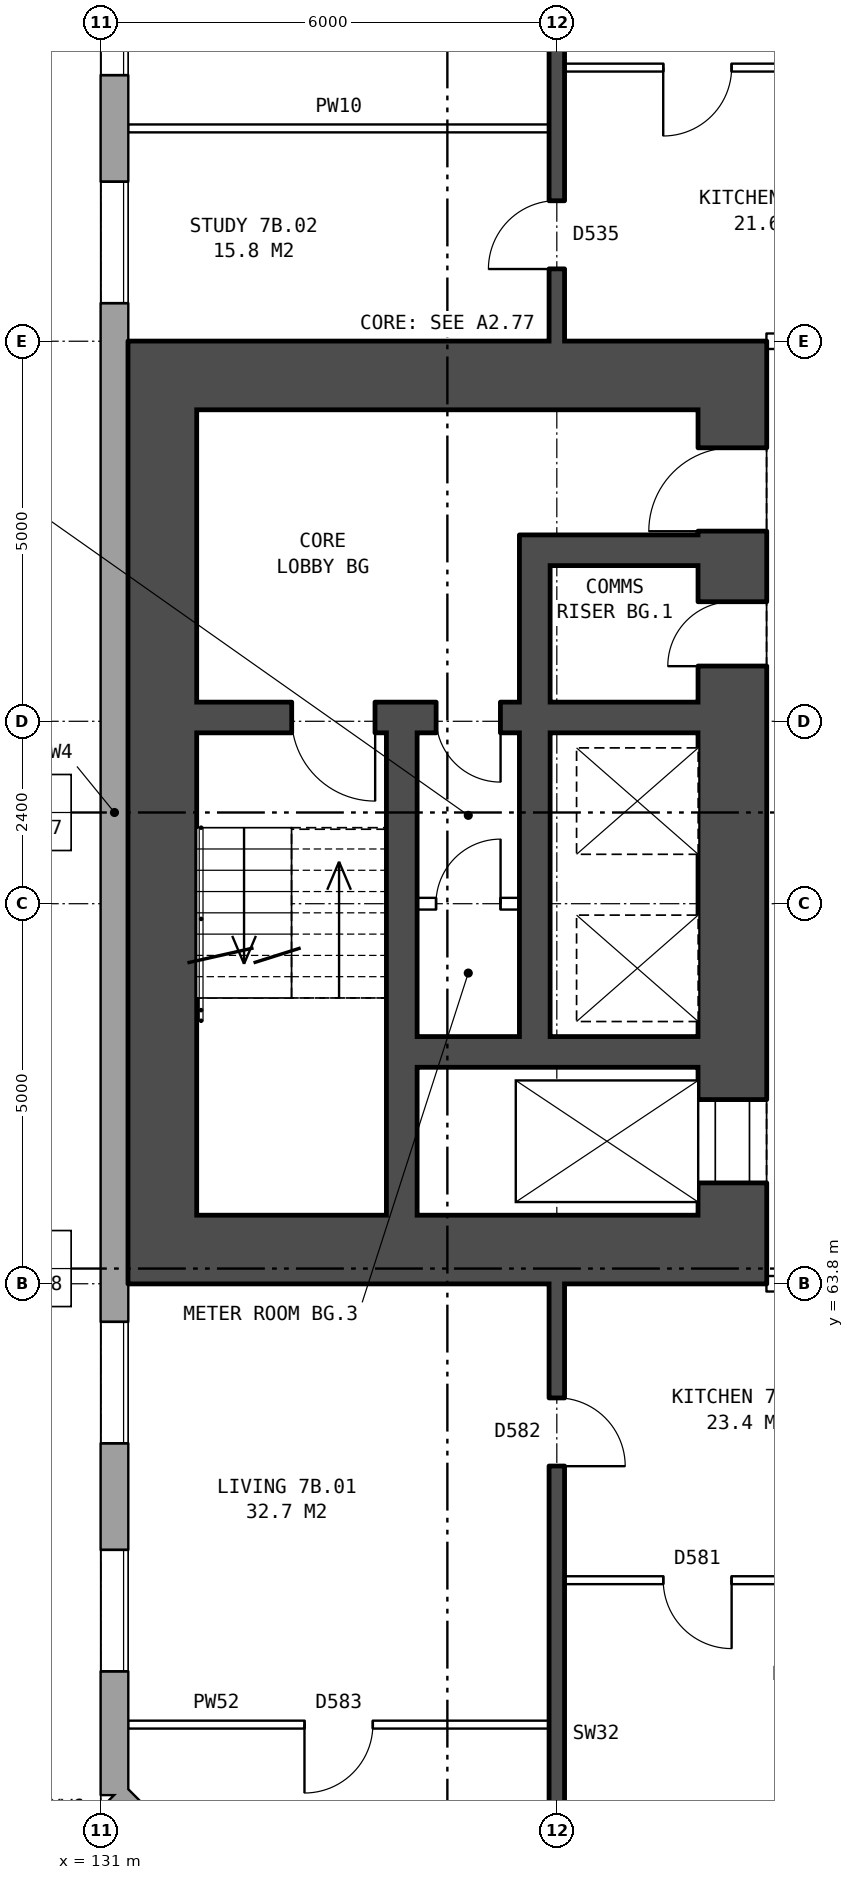
"""IFC4 building model, lengths in metres.
Left out: names, types, materials, properties, quantities, classifications, styles, units other than length and angle.
Written with IfcOpenShell. Run it as: python <this file> out.ifc"""

import sys

from ifc_helpers import new_model, si_unit, direction, frame, frame_2d, origin, place, context, subcontext, project, spatial, rectangle, extrude, element, fill, save


model = new_model("IFC4")
c1 = context("Model", 3, precision=1e-05, world=origin(), true_north=direction((0.0, 1.0)))
c2 = subcontext(c1, "Body", "Model", "MODEL_VIEW")
j1 = project(units=[si_unit("LENGTHUNIT", "METRE"), si_unit("PLANEANGLEUNIT", "RADIAN")], contexts=[c1])
p1 = place(None, origin())
s1 = spatial("IfcSite", under=j1, at=p1, CompositionType="ELEMENT")
p2 = place(p1, origin())
s2 = spatial("IfcBuilding", under=s1, at=p2, CompositionType="ELEMENT")
p3 = place(p2, frame((0.0, 0.0, 28.8)))
s3 = spatial("IfcBuildingStorey", under=s2, at=p3, CompositionType="ELEMENT", Elevation=28.8)
p4 = place(p3, frame((131.18, 57.075, 0.0), z_axis=(0.0, 0.0, 1.0), x_axis=(0.707106781187, -0.707106781187, 0.0)))
e1 = element("IfcWall", 1, at=p4, inside=s3, PredefinedType="STANDARD", context=c2, shape_type="SweptSolid", body=[
    extrude(rectangle(XDim=4.094, YDim=0.36, at=frame_2d((2.047, 0.0))), origin(), (0.0, 0.0, 1.0), 2.85),
])
p5 = place(p4, frame((1.247, 0.0, 0.8)))
e2 = element("IfcOpeningElement", 2, at=p5, cuts=e1, PredefinedType="OPENING", context=c2, shape_type="SweptSolid", body=[
    extrude(rectangle(XDim=1.6, YDim=1.8, at=frame_2d((0.8, 0.9))), frame((0.0, 0.19, 0.0), z_axis=(0.0, -1.0, 0.0), x_axis=(1.0, 0.0, 0.0)), (0.0, 0.0, 1.0), 0.38),
])
p6 = place(p3, frame((131.18, 82.925, 0.0), z_axis=(0.0, 0.0, 1.0), x_axis=(0.0, -1.0, 0.0)))
e3 = element("IfcWall", 3, at=p6, inside=s3, PredefinedType="STANDARD", context=c2, shape_type="SweptSolid", body=[
    extrude(rectangle(XDim=25.851, YDim=0.36, at=frame_2d((12.925, 0.0))), origin(), (0.0, 0.0, 1.0), 2.85),
])
p7 = place(p6, frame((1.625, 0.0, 0.8)))
e4 = element("IfcOpeningElement", 4, at=p7, cuts=e3, PredefinedType="OPENING", context=c2, shape_type="SweptSolid", body=[
    extrude(rectangle(XDim=1.6, YDim=1.8, at=frame_2d((0.8, 0.9))), frame((0.0, 0.19, 0.0), z_axis=(0.0, -1.0, 0.0), x_axis=(1.0, 0.0, 0.0)), (0.0, 0.0, 1.0), 0.38),
])
p8 = place(p6, frame((4.625, 0.0, 0.8)))
e5 = element("IfcOpeningElement", 5, at=p8, cuts=e3, PredefinedType="OPENING", context=c2, shape_type="SweptSolid", body=[
    extrude(rectangle(XDim=1.6, YDim=1.8, at=frame_2d((0.8, 0.9))), frame((0.0, 0.19, 0.0), z_axis=(0.0, -1.0, 0.0), x_axis=(1.0, 0.0, 0.0)), (0.0, 0.0, 1.0), 0.38),
])
p9 = place(p6, frame((19.625, 0.0, 0.8)))
e6 = element("IfcOpeningElement", 6, at=p9, cuts=e3, PredefinedType="OPENING", context=c2, shape_type="SweptSolid", body=[
    extrude(rectangle(XDim=1.6, YDim=1.8, at=frame_2d((0.8, 0.9))), frame((0.0, 0.19, 0.0), z_axis=(0.0, -1.0, 0.0), x_axis=(1.0, 0.0, 0.0)), (0.0, 0.0, 1.0), 0.38),
])
p10 = place(p6, frame((22.625, 0.0, 0.8)))
e7 = element("IfcOpeningElement", 7, at=p10, cuts=e3, PredefinedType="OPENING", context=c2, shape_type="SweptSolid", body=[
    extrude(rectangle(XDim=1.6, YDim=1.8, at=frame_2d((0.8, 0.9))), frame((0.0, 0.19, 0.0), z_axis=(0.0, -1.0, 0.0), x_axis=(1.0, 0.0, 0.0)), (0.0, 0.0, 1.0), 0.38),
])
p11 = place(p3, frame((139.31, 64.7, 0.0), z_axis=(0.0, 0.0, 1.0), x_axis=(0.0, 1.0, 0.0)))
e8 = element("IfcWall", 8, at=p11, inside=s3, PredefinedType="SHEAR", context=c2, shape_type="SweptSolid", body=[
    extrude(rectangle(XDim=10.6, YDim=0.9, at=frame_2d((5.3, 0.0))), origin(), (0.0, 0.0, 1.0), 2.85),
])
p12 = place(p11, frame((0.425, 0.0, 0.0)))
e9 = element("IfcOpeningElement", 9, at=p12, cuts=e8, PredefinedType="OPENING", context=c2, shape_type="SweptSolid", body=[
    extrude(rectangle(XDim=1.1, YDim=2.1, at=frame_2d((0.55, 1.05))), frame((0.0, 0.46, 0.0), z_axis=(0.0, -1.0, 0.0), x_axis=(1.0, 0.0, 0.0)), (0.0, 0.0, 1.0), 0.92),
])
p13 = place(p11, frame((9.0, 0.0, 0.0)))
e10 = element("IfcOpeningElement", 10, at=p13, cuts=e8, PredefinedType="OPENING", context=c2, shape_type="SweptSolid", body=[
    extrude(rectangle(XDim=1.1, YDim=2.1, at=frame_2d((0.55, 1.05))), frame((0.0, 0.46, 0.0), z_axis=(0.0, -1.0, 0.0), x_axis=(1.0, 0.0, 0.0)), (0.0, 0.0, 1.0), 0.92),
])
p14 = place(p11, frame((7.225, 0.0, 0.0)))
e11 = element("IfcOpeningElement", 11, at=p14, cuts=e8, PredefinedType="OPENING", context=c2, shape_type="SweptSolid", body=[
    extrude(rectangle(XDim=0.85, YDim=2.1, at=frame_2d((0.425, 1.05))), frame((0.0, 0.46, 0.0), z_axis=(0.0, -1.0, 0.0), x_axis=(1.0, 0.0, 0.0)), (0.0, 0.0, 1.0), 0.92),
])
p15 = place(p3, frame((131.81, 64.7, 0.0), z_axis=(0.0, 0.0, 1.0), x_axis=(0.0, 1.0, 0.0)))
e12 = element("IfcWall", 12, at=p15, inside=s3, PredefinedType="SHEAR", context=c2, shape_type="SweptSolid", body=[
    extrude(rectangle(XDim=10.6, YDim=0.9, at=frame_2d((5.3, 0.0))), origin(), (0.0, 0.0, 1.0), 2.85),
])
for number, where, z_axis, x_axis in (
    (13, (139.76, 64.25, 0.0), (0.0, 0.0, 1.0), (-1.0, 0.0, 0.0)),
    (14, (139.76, 75.75, 0.0), (0.0, 0.0, 1.0), (-1.0, 0.0, 0.0)),
):
    element("IfcWall", number, at=place(p3, frame(where, z_axis=z_axis, x_axis=x_axis)), inside=s3, PredefinedType="SHEAR", context=c2, shape_type="SweptSolid", body=[
        extrude(rectangle(XDim=8.4, YDim=0.9, at=frame_2d((4.2, 0.0))), origin(), (0.0, 0.0, 1.0), 2.85),
    ])
p16 = place(p3, frame((138.86, 66.85, 0.0), z_axis=(0.0, 0.0, 1.0), x_axis=(-1.0, 0.0, 0.0)))
e15 = element("IfcWall", 15, at=p16, inside=s3, PredefinedType="SHEAR", context=c2, shape_type="SweptSolid", body=[
    extrude(rectangle(XDim=3.7, YDim=0.4, at=frame_2d((1.85, 0.0))), origin(), (0.0, 0.0, 1.0), 2.85),
])
p17 = place(p3, frame((136.51, 68.8, 0.0), z_axis=(0.0, 0.0, 1.0), x_axis=(-1.0, 0.0, 0.0)))
e16 = element("IfcWall", 16, at=p17, inside=s3, PredefinedType="PARTITIONING", context=c2, shape_type="SweptSolid", body=[
    extrude(rectangle(XDim=1.35, YDim=0.15, at=frame_2d((0.675, 0.0))), origin(), (0.0, 0.0, 1.0), 2.85),
])
p18 = place(p17, frame((0.25, 0.0, 0.0)))
e17 = element("IfcOpeningElement", 17, at=p18, cuts=e16, PredefinedType="OPENING", context=c2, shape_type="SweptSolid", body=[
    extrude(rectangle(XDim=0.85, YDim=2.1, at=frame_2d((0.425, 1.05))), frame((0.0, 0.085, 0.0), z_axis=(0.0, -1.0, 0.0), x_axis=(1.0, 0.0, 0.0)), (0.0, 0.0, 1.0), 0.17),
])
p19 = place(p3, frame((138.86, 71.25, 0.0), z_axis=(0.0, 0.0, 1.0), x_axis=(-1.0, 0.0, 0.0)))
e18 = element("IfcWall", 18, at=p19, inside=s3, PredefinedType="SHEAR", context=c2, shape_type="SweptSolid", body=[
    extrude(rectangle(XDim=6.6, YDim=0.4, at=frame_2d((3.3, 0.0))), origin(), (0.0, 0.0, 1.0), 2.85),
])
p20 = place(p19, frame((4.25, 0.0, 0.0)))
e19 = element("IfcOpeningElement", 19, at=p20, cuts=e18, PredefinedType="OPENING", context=c2, shape_type="SweptSolid", body=[
    extrude(rectangle(XDim=1.1, YDim=2.1, at=frame_2d((0.55, 1.05))), frame((0.0, 0.21, 0.0), z_axis=(0.0, -1.0, 0.0), x_axis=(1.0, 0.0, 0.0)), (0.0, 0.0, 1.0), 0.42),
])
p21 = place(p19, frame((2.6, 0.0, 0.0)))
e20 = element("IfcOpeningElement", 20, at=p21, cuts=e18, PredefinedType="OPENING", context=c2, shape_type="SweptSolid", body=[
    extrude(rectangle(XDim=0.85, YDim=2.1, at=frame_2d((0.425, 1.05))), frame((0.0, 0.21, 0.0), z_axis=(0.0, -1.0, 0.0), x_axis=(1.0, 0.0, 0.0)), (0.0, 0.0, 1.0), 0.42),
])
p22 = place(p3, frame((138.86, 73.45, 0.0), z_axis=(0.0, 0.0, 1.0), x_axis=(-1.0, 0.0, 0.0)))
e21 = element("IfcWall", 21, at=p22, inside=s3, PredefinedType="SHEAR", context=c2, shape_type="SweptSolid", body=[
    extrude(rectangle(XDim=1.95, YDim=0.4, at=frame_2d((0.975, 0.0))), origin(), (0.0, 0.0, 1.0), 2.85),
])
p23 = place(p3, frame((136.71, 67.05, 0.0), z_axis=(0.0, 0.0, 1.0), x_axis=(0.0, 1.0, 0.0)))
e22 = element("IfcWall", 22, at=p23, inside=s3, PredefinedType="SHEAR", context=c2, shape_type="SweptSolid", body=[
    extrude(rectangle(XDim=4.0, YDim=0.4, at=frame_2d((2.0, 0.0))), origin(), (0.0, 0.0, 1.0), 2.85),
])
p24 = place(p3, frame((136.71, 71.45, 0.0), z_axis=(0.0, 0.0, 1.0), x_axis=(0.0, 1.0, 0.0)))
e23 = element("IfcWall", 23, at=p24, inside=s3, PredefinedType="SHEAR", context=c2, shape_type="SweptSolid", body=[
    extrude(rectangle(XDim=2.2, YDim=0.4, at=frame_2d((1.1, 0.0))), origin(), (0.0, 0.0, 1.0), 2.85),
])
p25 = place(p3, frame((134.96, 64.7, 0.0), z_axis=(0.0, 0.0, 1.0), x_axis=(0.0, 1.0, 0.0)))
e24 = element("IfcWall", 24, at=p25, inside=s3, PredefinedType="SHEAR", context=c2, shape_type="SweptSolid", body=[
    extrude(rectangle(XDim=6.35, YDim=0.4, at=frame_2d((3.175, 0.0))), origin(), (0.0, 0.0, 1.0), 2.85),
])
p26 = place(p3, frame((131.36, 58.0, 0.0), z_axis=(0.0, 0.0, 1.0), x_axis=(1.0, 0.0, 0.0)))
e25 = element("IfcWall", 25, at=p26, inside=s3, PredefinedType="PARTITIONING", context=c2, shape_type="SweptSolid", body=[
    extrude(rectangle(XDim=5.54, YDim=0.1, at=frame_2d((2.77, 0.0))), origin(), (0.0, 0.0, 1.0), 2.85),
])
p27 = place(p26, frame((2.32, 0.0, 0.0)))
e26 = element("IfcOpeningElement", 26, at=p27, cuts=e25, PredefinedType="OPENING", context=c2, shape_type="SweptSolid", body=[
    extrude(rectangle(XDim=0.9, YDim=2.1, at=frame_2d((0.45, 1.05))), frame((0.0, 0.06, 0.0), z_axis=(0.0, -1.0, 0.0), x_axis=(1.0, 0.0, 0.0)), (0.0, 0.0, 1.0), 0.12),
])
p28 = place(p3, frame((137.1, 59.9, 0.0), z_axis=(0.0, 0.0, 1.0), x_axis=(1.0, 0.0, 0.0)))
e27 = element("IfcWall", 27, at=p28, inside=s3, PredefinedType="PARTITIONING", context=c2, shape_type="SweptSolid", body=[
    extrude(rectangle(XDim=5.8, YDim=0.1, at=frame_2d((2.9, 0.0))), origin(), (0.0, 0.0, 1.0), 2.85),
])
p29 = place(p28, frame((1.3, 0.0, 0.0)))
e28 = element("IfcOpeningElement", 28, at=p29, cuts=e27, PredefinedType="OPENING", context=c2, shape_type="SweptSolid", body=[
    extrude(rectangle(XDim=0.9, YDim=2.1, at=frame_2d((0.45, 1.05))), frame((0.0, 0.06, 0.0), z_axis=(0.0, -1.0, 0.0), x_axis=(1.0, 0.0, 0.0)), (0.0, 0.0, 1.0), 0.12),
])
p30 = place(p28, frame((4.2, 0.0, 0.0)))
e29 = element("IfcOpeningElement", 29, at=p30, cuts=e27, PredefinedType="OPENING", context=c2, shape_type="SweptSolid", body=[
    extrude(rectangle(XDim=0.9, YDim=2.1, at=frame_2d((0.45, 1.05))), frame((0.0, 0.06, 0.0), z_axis=(0.0, -1.0, 0.0), x_axis=(1.0, 0.0, 0.0)), (0.0, 0.0, 1.0), 0.12),
])
p31 = place(p3, frame((139.76, 63.8, 0.0), z_axis=(0.0, 0.0, 1.0), x_axis=(1.0, 0.0, 0.0)))
e30 = element("IfcWall", 30, at=p31, inside=s3, PredefinedType="PARTITIONING", context=c2, shape_type="SweptSolid", body=[
    extrude(rectangle(XDim=3.0, YDim=0.2, at=frame_2d((1.5, 0.0))), origin(), (0.0, 0.0, 1.0), 2.85),
])
p32 = place(p31, frame((1.0, 0.0, 0.0)))
e31 = element("IfcOpeningElement", 31, at=p32, cuts=e30, PredefinedType="OPENING", context=c2, shape_type="SweptSolid", body=[
    extrude(rectangle(XDim=1.0, YDim=2.1, at=frame_2d((0.5, 1.05))), frame((0.0, 0.11, 0.0), z_axis=(0.0, -1.0, 0.0), x_axis=(1.0, 0.0, 0.0)), (0.0, 0.0, 1.0), 0.22),
])
p33 = place(p3, frame((139.76, 76.2, 0.0), z_axis=(0.0, 0.0, 1.0), x_axis=(1.0, 0.0, 0.0)))
e32 = element("IfcWall", 32, at=p33, inside=s3, PredefinedType="PARTITIONING", context=c2, shape_type="SweptSolid", body=[
    extrude(rectangle(XDim=3.0, YDim=0.2, at=frame_2d((1.5, 0.0))), origin(), (0.0, 0.0, 1.0), 2.85),
])
p34 = place(p33, frame((1.0, 0.0, 0.0)))
e33 = element("IfcOpeningElement", 33, at=p34, cuts=e32, PredefinedType="OPENING", context=c2, shape_type="SweptSolid", body=[
    extrude(rectangle(XDim=1.0, YDim=2.1, at=frame_2d((0.5, 1.05))), frame((0.0, 0.11, 0.0), z_axis=(0.0, -1.0, 0.0), x_axis=(1.0, 0.0, 0.0)), (0.0, 0.0, 1.0), 0.22),
])
p35 = place(p3, frame((131.36, 79.0, 0.0), z_axis=(0.0, 0.0, 1.0), x_axis=(1.0, 0.0, 0.0)))
e34 = element("IfcWall", 34, at=p35, inside=s3, PredefinedType="PARTITIONING", context=c2, shape_type="SweptSolid", body=[
    extrude(rectangle(XDim=5.54, YDim=0.1, at=frame_2d((2.77, 0.0))), origin(), (0.0, 0.0, 1.0), 2.85),
])
p36 = place(p3, frame((137.1, 79.8, 0.0), z_axis=(0.0, 0.0, 1.0), x_axis=(1.0, 0.0, 0.0)))
e35 = element("IfcWall", 35, at=p36, inside=s3, PredefinedType="PARTITIONING", context=c2, shape_type="SweptSolid", body=[
    extrude(rectangle(XDim=5.8, YDim=0.1, at=frame_2d((2.9, 0.0))), origin(), (0.0, 0.0, 1.0), 2.85),
])
p37 = place(p36, frame((1.3, 0.0, 0.0)))
e36 = element("IfcOpeningElement", 36, at=p37, cuts=e35, PredefinedType="OPENING", context=c2, shape_type="SweptSolid", body=[
    extrude(rectangle(XDim=0.9, YDim=2.1, at=frame_2d((0.45, 1.05))), frame((0.0, 0.06, 0.0), z_axis=(0.0, -1.0, 0.0), x_axis=(1.0, 0.0, 0.0)), (0.0, 0.0, 1.0), 0.12),
])
p38 = place(p36, frame((4.2, 0.0, 0.0)))
e37 = element("IfcOpeningElement", 37, at=p38, cuts=e35, PredefinedType="OPENING", context=c2, shape_type="SweptSolid", body=[
    extrude(rectangle(XDim=0.9, YDim=2.1, at=frame_2d((0.45, 1.05))), frame((0.0, 0.06, 0.0), z_axis=(0.0, -1.0, 0.0), x_axis=(1.0, 0.0, 0.0)), (0.0, 0.0, 1.0), 0.12),
])
p39 = place(p3, frame((137.0, 54.36, 0.0), z_axis=(0.0, 0.0, 1.0), x_axis=(0.0, 1.0, 0.0)))
e38 = element("IfcWall", 38, at=p39, inside=s3, PredefinedType="SOLIDWALL", context=c2, shape_type="SweptSolid", body=[
    extrude(rectangle(XDim=9.44, YDim=0.2, at=frame_2d((4.72, 0.0))), origin(), (0.0, 0.0, 1.0), 2.85),
])
p40 = place(p39, frame((7.04, 0.0, 0.0)))
e39 = element("IfcOpeningElement", 39, at=p40, cuts=e38, PredefinedType="OPENING", context=c2, shape_type="SweptSolid", body=[
    extrude(rectangle(XDim=0.9, YDim=2.1, at=frame_2d((0.45, 1.05))), frame((0.0, 0.11, 0.0), z_axis=(0.0, -1.0, 0.0), x_axis=(1.0, 0.0, 0.0)), (0.0, 0.0, 1.0), 0.22),
])
p41 = place(p3, frame((137.0, 76.2, 0.0), z_axis=(0.0, 0.0, 1.0), x_axis=(0.0, 1.0, 0.0)))
e40 = element("IfcWall", 40, at=p41, inside=s3, PredefinedType="SOLIDWALL", context=c2, shape_type="SweptSolid", body=[
    extrude(rectangle(XDim=9.44, YDim=0.2, at=frame_2d((4.72, 0.0))), origin(), (0.0, 0.0, 1.0), 2.85),
])
p42 = place(p41, frame((6.07, 0.0, 0.0)))
e41 = element("IfcOpeningElement", 41, at=p42, cuts=e40, PredefinedType="OPENING", context=c2, shape_type="SweptSolid", body=[
    extrude(rectangle(XDim=0.9, YDim=2.1, at=frame_2d((0.45, 1.05))), frame((0.0, 0.11, 0.0), z_axis=(0.0, -1.0, 0.0), x_axis=(1.0, 0.0, 0.0)), (0.0, 0.0, 1.0), 0.22),
])
p43 = place(p41, frame((0.95, 0.0, 0.0)))
e42 = element("IfcOpeningElement", 42, at=p43, cuts=e40, PredefinedType="OPENING", context=c2, shape_type="SweptSolid", body=[
    extrude(rectangle(XDim=0.9, YDim=2.1, at=frame_2d((0.45, 1.05))), frame((0.0, 0.11, 0.0), z_axis=(0.0, -1.0, 0.0), x_axis=(1.0, 0.0, 0.0)), (0.0, 0.0, 1.0), 0.22),
])
p44 = place(p7, origin())
e43 = element("IfcWindow", 43, at=p44, inside=s3, PartitioningType="SINGLE_PANEL", PredefinedType="WINDOW", context=c2, shape_type="SweptSolid", body=[
    extrude(rectangle(XDim=1.6, YDim=1.8, at=frame_2d((0.8, 0.9))), frame((0.0, 0.15, 0.0), z_axis=(0.0, -1.0, 0.0), x_axis=(1.0, 0.0, 0.0)), (0.0, 0.0, 1.0), 0.06),
])
fill(e4, e43)
p45 = place(p8, origin())
e44 = element("IfcWindow", 44, at=p45, inside=s3, PartitioningType="SINGLE_PANEL", PredefinedType="WINDOW", context=c2, shape_type="SweptSolid", body=[
    extrude(rectangle(XDim=1.6, YDim=1.8, at=frame_2d((0.8, 0.9))), frame((0.0, 0.15, 0.0), z_axis=(0.0, -1.0, 0.0), x_axis=(1.0, 0.0, 0.0)), (0.0, 0.0, 1.0), 0.06),
])
fill(e5, e44)
p46 = place(p9, origin())
e45 = element("IfcWindow", 45, at=p46, inside=s3, PartitioningType="SINGLE_PANEL", PredefinedType="WINDOW", context=c2, shape_type="SweptSolid", body=[
    extrude(rectangle(XDim=1.6, YDim=1.8, at=frame_2d((0.8, 0.9))), frame((0.0, 0.15, 0.0), z_axis=(0.0, -1.0, 0.0), x_axis=(1.0, 0.0, 0.0)), (0.0, 0.0, 1.0), 0.06),
])
fill(e6, e45)
p47 = place(p10, origin())
e46 = element("IfcWindow", 46, at=p47, inside=s3, PartitioningType="SINGLE_PANEL", PredefinedType="WINDOW", context=c2, shape_type="SweptSolid", body=[
    extrude(rectangle(XDim=1.6, YDim=1.8, at=frame_2d((0.8, 0.9))), frame((0.0, 0.15, 0.0), z_axis=(0.0, -1.0, 0.0), x_axis=(1.0, 0.0, 0.0)), (0.0, 0.0, 1.0), 0.06),
])
fill(e7, e46)
p48 = place(p12, origin())
e47 = element("IfcDoor", 47, at=p48, inside=s3, OperationType="DOUBLE_DOOR_SLIDING", PredefinedType="DOOR", context=c2, shape_type="SweptSolid", body=[
    extrude(rectangle(XDim=1.1, YDim=2.1, at=frame_2d((0.55, 1.05))), frame((0.0, 0.435, 0.0), z_axis=(0.0, -1.0, 0.0), x_axis=(1.0, 0.0, 0.0)), (0.0, 0.0, 1.0), 0.05),
])
fill(e9, e47)
p49 = place(p13, origin())
e48 = element("IfcDoor", 48, at=p49, inside=s3, OperationType="SINGLE_SWING_LEFT", PredefinedType="DOOR", context=c2, shape_type="SweptSolid", body=[
    extrude(rectangle(XDim=1.1, YDim=2.1, at=frame_2d((0.55, 1.05))), frame((0.0, 0.435, 0.0), z_axis=(0.0, -1.0, 0.0), x_axis=(1.0, 0.0, 0.0)), (0.0, 0.0, 1.0), 0.05),
])
fill(e10, e48)
p50 = place(p20, origin())
e49 = element("IfcDoor", 49, at=p50, inside=s3, OperationType="SINGLE_SWING_LEFT", PredefinedType="DOOR", context=c2, shape_type="SweptSolid", body=[
    extrude(rectangle(XDim=1.1, YDim=2.1, at=frame_2d((0.55, 1.05))), frame((0.0, 0.025, 0.0), z_axis=(0.0, -1.0, 0.0), x_axis=(1.0, 0.0, 0.0)), (0.0, 0.0, 1.0), 0.05),
])
fill(e19, e49)
p51 = place(p14, origin())
e50 = element("IfcDoor", 50, at=p51, inside=s3, OperationType="SINGLE_SWING_LEFT", PredefinedType="DOOR", context=c2, shape_type="SweptSolid", body=[
    extrude(rectangle(XDim=0.85, YDim=2.1, at=frame_2d((0.425, 1.05))), frame((0.0, 0.435, 0.0), z_axis=(0.0, -1.0, 0.0), x_axis=(1.0, 0.0, 0.0)), (0.0, 0.0, 1.0), 0.05),
])
fill(e11, e50)
p52 = place(p21, origin())
e51 = element("IfcDoor", 51, at=p52, inside=s3, OperationType="SINGLE_SWING_LEFT", PredefinedType="DOOR", context=c2, shape_type="SweptSolid", body=[
    extrude(rectangle(XDim=0.85, YDim=2.1, at=frame_2d((0.425, 1.05))), frame((0.0, 0.025, 0.0), z_axis=(0.0, -1.0, 0.0), x_axis=(1.0, 0.0, 0.0)), (0.0, 0.0, 1.0), 0.05),
])
fill(e20, e51)
p53 = place(p18, frame((0.85, 0.0, 0.0), z_axis=(0.0, 0.0, 1.0), x_axis=(-1.0, 0.0, 0.0)))
e52 = element("IfcDoor", 52, at=p53, inside=s3, OperationType="SINGLE_SWING_RIGHT", PredefinedType="DOOR", context=c2, shape_type="SweptSolid", body=[
    extrude(rectangle(XDim=0.85, YDim=2.1, at=frame_2d((0.425, 1.05))), frame((0.0, 0.025, 0.0), z_axis=(0.0, -1.0, 0.0), x_axis=(1.0, 0.0, 0.0)), (0.0, 0.0, 1.0), 0.05),
])
fill(e17, e52)
p54 = place(p29, frame((0.9, 0.0, 0.0), z_axis=(0.0, 0.0, 1.0), x_axis=(-1.0, 0.0, 0.0)))
e53 = element("IfcDoor", 53, at=p54, inside=s3, OperationType="SINGLE_SWING_LEFT", PredefinedType="DOOR", context=c2, shape_type="SweptSolid", body=[
    extrude(rectangle(XDim=0.9, YDim=2.1, at=frame_2d((0.45, 1.05))), frame((0.0, 0.025, 0.0), z_axis=(0.0, -1.0, 0.0), x_axis=(1.0, 0.0, 0.0)), (0.0, 0.0, 1.0), 0.05),
])
fill(e28, e53)
p55 = place(p27, frame((0.9, 0.0, 0.0), z_axis=(0.0, 0.0, 1.0), x_axis=(-1.0, 0.0, 0.0)))
e54 = element("IfcDoor", 54, at=p55, inside=s3, OperationType="SINGLE_SWING_RIGHT", PredefinedType="DOOR", context=c2, shape_type="SweptSolid", body=[
    extrude(rectangle(XDim=0.9, YDim=2.1, at=frame_2d((0.45, 1.05))), frame((0.0, 0.025, 0.0), z_axis=(0.0, -1.0, 0.0), x_axis=(1.0, 0.0, 0.0)), (0.0, 0.0, 1.0), 0.05),
])
fill(e26, e54)
p56 = place(p40, frame((0.9, 0.0, 0.0), z_axis=(0.0, 0.0, 1.0), x_axis=(-1.0, 0.0, 0.0)))
e55 = element("IfcDoor", 55, at=p56, inside=s3, OperationType="SINGLE_SWING_RIGHT", PredefinedType="DOOR", context=c2, shape_type="SweptSolid", body=[
    extrude(rectangle(XDim=0.9, YDim=2.1, at=frame_2d((0.45, 1.05))), frame((0.0, 0.025, 0.0), z_axis=(0.0, -1.0, 0.0), x_axis=(1.0, 0.0, 0.0)), (0.0, 0.0, 1.0), 0.05),
])
fill(e39, e55)
p57 = place(p43, origin())
e56 = element("IfcDoor", 56, at=p57, inside=s3, OperationType="SINGLE_SWING_LEFT", PredefinedType="DOOR", context=c2, shape_type="SweptSolid", body=[
    extrude(rectangle(XDim=0.9, YDim=2.1, at=frame_2d((0.45, 1.05))), frame((0.0, 0.025, 0.0), z_axis=(0.0, -1.0, 0.0), x_axis=(1.0, 0.0, 0.0)), (0.0, 0.0, 1.0), 0.05),
])
fill(e42, e56)
p58 = place(p37, frame((0.9, 0.0, 0.0), z_axis=(0.0, 0.0, 1.0), x_axis=(-1.0, 0.0, 0.0)))
e57 = element("IfcDoor", 57, at=p58, inside=s3, OperationType="SINGLE_SWING_RIGHT", PredefinedType="DOOR", context=c2, shape_type="SweptSolid", body=[
    extrude(rectangle(XDim=0.9, YDim=2.1, at=frame_2d((0.45, 1.05))), frame((0.0, 0.025, 0.0), z_axis=(0.0, -1.0, 0.0), x_axis=(1.0, 0.0, 0.0)), (0.0, 0.0, 1.0), 0.05),
])
fill(e36, e57)
save(model, sys.argv[1])
